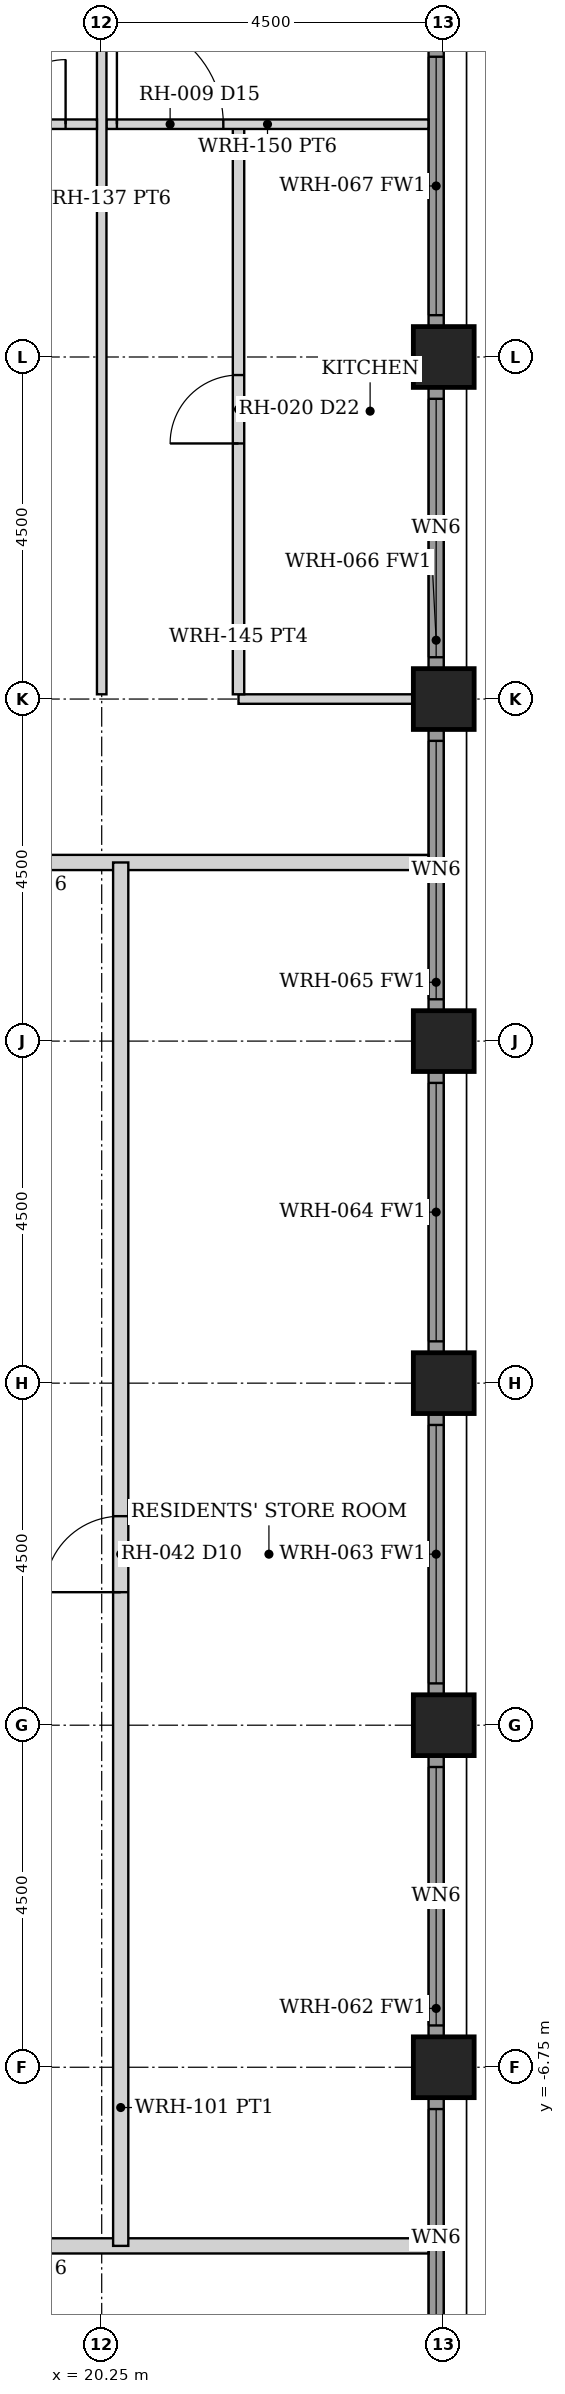
"""IFC4 building model, lengths in metres.
Left out: names, types, materials, properties, quantities, classifications, styles, units other than length and angle.
Written with IfcOpenShell. Run it as: python <this file> out.ifc"""

import sys

from ifc_helpers import new_model, si_unit, direction, frame, frame_2d, origin, origin_2d, place, context, subcontext, project, spatial, rectangle, hollow_rectangle, extrude, element, fill, save


model = new_model("IFC4")
c1 = context("Model", 3, precision=1e-05, world=origin(), true_north=direction((0.0, 1.0)))
c2 = subcontext(c1, "Body", "Model", "MODEL_VIEW")
j1 = project(units=[si_unit("LENGTHUNIT", "METRE"), si_unit("PLANEANGLEUNIT", "RADIAN")], contexts=[c1])
p1 = place(None, origin())
s1 = spatial("IfcSite", under=j1, at=p1, CompositionType="ELEMENT")
p2 = place(p1, origin())
s2 = spatial("IfcBuilding", under=s1, at=p2, CompositionType="ELEMENT")
p3 = place(p2, frame((0.0, 0.0, 103.5)))
s3 = spatial("IfcBuildingStorey", under=s2, at=p3, CompositionType="ELEMENT", Elevation=103.5)
for number, where, z_axis, x_axis in (
    (1, (24.75, -6.75, 0.0), (0.0, 0.0, 1.0), (1.0, 0.0, 0.0)),
    (2, (24.75, -2.25, 0.0), (0.0, 0.0, 1.0), (1.0, 0.0, 0.0)),
    (3, (24.75, 2.25, 0.0), (0.0, 0.0, 1.0), (1.0, 0.0, 0.0)),
    (4, (24.75, 6.75, 0.0), (0.0, 0.0, 1.0), (1.0, 0.0, 0.0)),
    (5, (24.75, 11.25, 0.0), (0.0, 0.0, 1.0), (1.0, 0.0, 0.0)),
    (6, (24.75, 15.75, 0.0), (0.0, 0.0, 1.0), (1.0, 0.0, 0.0)),
):
    element("IfcColumn", number, at=place(p3, frame(where, z_axis=z_axis, x_axis=x_axis)), inside=s3, PredefinedType="COLUMN", context=c2, shape_type="SweptSolid", body=[
        extrude(hollow_rectangle(XDim=0.8, YDim=0.8, WallThickness=0.06, at=origin_2d()), origin(), (0.0, 0.0, 1.0), 3.5),
    ])
p4 = place(p3, frame((24.65, -10.845, 0.0), z_axis=(0.0, 0.0, 1.0), x_axis=(0.0, 1.0, 0.0)))
e7 = element("IfcWall", 7, at=p4, inside=s3, PredefinedType="SOLIDWALL", context=c2, shape_type="SweptSolid", body=[
    extrude(rectangle(XDim=3.69, YDim=0.2, at=frame_2d((1.845, 0.0))), origin(), (0.0, 0.0, 1.0), 2.279),
])
p5 = place(p4, frame((0.145, 0.0, 0.3)))
e8 = element("IfcOpeningElement", 8, at=p5, cuts=e7, PredefinedType="OPENING", context=c2, shape_type="SweptSolid", body=[
    extrude(rectangle(XDim=3.4, YDim=1.829, at=frame_2d((1.7, 0.915))), frame((0.0, 0.11, 0.0), z_axis=(0.0, -1.0, 0.0), x_axis=(1.0, 0.0, 0.0)), (0.0, 0.0, 1.0), 0.22),
])
p6 = place(p3, frame((24.65, -6.345, 0.0), z_axis=(0.0, 0.0, 1.0), x_axis=(0.0, 1.0, 0.0)))
e9 = element("IfcWall", 9, at=p6, inside=s3, PredefinedType="SOLIDWALL", context=c2, shape_type="SweptSolid", body=[
    extrude(rectangle(XDim=3.69, YDim=0.2, at=frame_2d((1.845, 0.0))), origin(), (0.0, 0.0, 1.0), 2.279),
])
p7 = place(p6, frame((0.145, 0.0, 0.3)))
e10 = element("IfcOpeningElement", 10, at=p7, cuts=e9, PredefinedType="OPENING", context=c2, shape_type="SweptSolid", body=[
    extrude(rectangle(XDim=3.4, YDim=1.829, at=frame_2d((1.7, 0.915))), frame((0.0, 0.11, 0.0), z_axis=(0.0, -1.0, 0.0), x_axis=(1.0, 0.0, 0.0)), (0.0, 0.0, 1.0), 0.22),
])
p8 = place(p3, frame((24.65, -1.845, 0.0), z_axis=(0.0, 0.0, 1.0), x_axis=(0.0, 1.0, 0.0)))
e11 = element("IfcWall", 11, at=p8, inside=s3, PredefinedType="SOLIDWALL", context=c2, shape_type="SweptSolid", body=[
    extrude(rectangle(XDim=3.69, YDim=0.2, at=frame_2d((1.845, 0.0))), origin(), (0.0, 0.0, 1.0), 2.279),
])
p9 = place(p8, frame((0.145, 0.0, 0.3)))
e12 = element("IfcOpeningElement", 12, at=p9, cuts=e11, PredefinedType="OPENING", context=c2, shape_type="SweptSolid", body=[
    extrude(rectangle(XDim=3.4, YDim=1.829, at=frame_2d((1.7, 0.915))), frame((0.0, 0.11, 0.0), z_axis=(0.0, -1.0, 0.0), x_axis=(1.0, 0.0, 0.0)), (0.0, 0.0, 1.0), 0.22),
])
p10 = place(p3, frame((24.65, 2.655, 0.0), z_axis=(0.0, 0.0, 1.0), x_axis=(0.0, 1.0, 0.0)))
e13 = element("IfcWall", 13, at=p10, inside=s3, PredefinedType="SOLIDWALL", context=c2, shape_type="SweptSolid", body=[
    extrude(rectangle(XDim=3.69, YDim=0.2, at=frame_2d((1.845, 0.0))), origin(), (0.0, 0.0, 1.0), 2.279),
])
p11 = place(p10, frame((0.145, 0.0, 0.3)))
e14 = element("IfcOpeningElement", 14, at=p11, cuts=e13, PredefinedType="OPENING", context=c2, shape_type="SweptSolid", body=[
    extrude(rectangle(XDim=3.4, YDim=1.829, at=frame_2d((1.7, 0.915))), frame((0.0, 0.11, 0.0), z_axis=(0.0, -1.0, 0.0), x_axis=(1.0, 0.0, 0.0)), (0.0, 0.0, 1.0), 0.22),
])
p12 = place(p3, frame((24.65, 7.155, 0.0), z_axis=(0.0, 0.0, 1.0), x_axis=(0.0, 1.0, 0.0)))
e15 = element("IfcWall", 15, at=p12, inside=s3, PredefinedType="SOLIDWALL", context=c2, shape_type="SweptSolid", body=[
    extrude(rectangle(XDim=3.69, YDim=0.2, at=frame_2d((1.845, 0.0))), origin(), (0.0, 0.0, 1.0), 2.279),
])
p13 = place(p12, frame((0.145, 0.0, 0.3)))
e16 = element("IfcOpeningElement", 16, at=p13, cuts=e15, PredefinedType="OPENING", context=c2, shape_type="SweptSolid", body=[
    extrude(rectangle(XDim=3.4, YDim=1.829, at=frame_2d((1.7, 0.915))), frame((0.0, 0.11, 0.0), z_axis=(0.0, -1.0, 0.0), x_axis=(1.0, 0.0, 0.0)), (0.0, 0.0, 1.0), 0.22),
])
p14 = place(p3, frame((24.65, 11.655, 0.0), z_axis=(0.0, 0.0, 1.0), x_axis=(0.0, 1.0, 0.0)))
e17 = element("IfcWall", 17, at=p14, inside=s3, PredefinedType="SOLIDWALL", context=c2, shape_type="SweptSolid", body=[
    extrude(rectangle(XDim=3.69, YDim=0.2, at=frame_2d((1.845, 0.0))), origin(), (0.0, 0.0, 1.0), 2.279),
])
p15 = place(p14, frame((0.145, 0.0, 0.3)))
e18 = element("IfcOpeningElement", 18, at=p15, cuts=e17, PredefinedType="OPENING", context=c2, shape_type="SweptSolid", body=[
    extrude(rectangle(XDim=3.4, YDim=1.829, at=frame_2d((1.7, 0.915))), frame((0.0, 0.11, 0.0), z_axis=(0.0, -1.0, 0.0), x_axis=(1.0, 0.0, 0.0)), (0.0, 0.0, 1.0), 0.22),
])
p16 = place(p3, frame((24.65, 16.155, 0.0), z_axis=(0.0, 0.0, 1.0), x_axis=(0.0, 1.0, 0.0)))
e19 = element("IfcWall", 19, at=p16, inside=s3, PredefinedType="SOLIDWALL", context=c2, shape_type="SweptSolid", body=[
    extrude(rectangle(XDim=3.69, YDim=0.2, at=frame_2d((1.845, 0.0))), origin(), (0.0, 0.0, 1.0), 2.279),
])
p17 = place(p16, frame((0.145, 0.0, 0.3)))
e20 = element("IfcOpeningElement", 20, at=p17, cuts=e19, PredefinedType="OPENING", context=c2, shape_type="SweptSolid", body=[
    extrude(rectangle(XDim=3.4, YDim=1.829, at=frame_2d((1.7, 0.915))), frame((0.0, 0.11, 0.0), z_axis=(0.0, -1.0, 0.0), x_axis=(1.0, 0.0, 0.0)), (0.0, 0.0, 1.0), 0.22),
])
p18 = place(p3, frame((-24.55, 9.1, 0.0), z_axis=(0.0, 0.0, 1.0), x_axis=(1.0, 0.0, 0.0)))
e21 = element("IfcWall", 21, at=p18, inside=s3, PredefinedType="PARTITIONING", context=c2, shape_type="SweptSolid", body=[
    extrude(rectangle(XDim=49.1, YDim=0.2, at=frame_2d((24.55, 0.0))), origin(), (0.0, 0.0, 1.0), 2.279),
])
p19 = place(p18, frame((5.05, 0.0, 0.0)))
e22 = element("IfcOpeningElement", 22, at=p19, cuts=e21, PredefinedType="OPENING", context=c2, shape_type="SweptSolid", body=[
    extrude(rectangle(XDim=1.0, YDim=2.3, at=frame_2d((0.5, 1.15))), frame((0.0, 0.11, 0.0), z_axis=(0.0, -1.0, 0.0), x_axis=(1.0, 0.0, 0.0)), (0.0, 0.0, 1.0), 0.22),
])
p20 = place(p18, frame((22.5, 0.0, 0.0)))
e23 = element("IfcOpeningElement", 23, at=p20, cuts=e21, PredefinedType="OPENING", context=c2, shape_type="SweptSolid", body=[
    extrude(rectangle(XDim=0.9, YDim=2.1, at=frame_2d((0.45, 1.05))), frame((0.0, 0.11, 0.0), z_axis=(0.0, -1.0, 0.0), x_axis=(1.0, 0.0, 0.0)), (0.0, 0.0, 1.0), 0.22),
])
p21 = place(p18, frame((43.05, 0.0, 0.0)))
e24 = element("IfcOpeningElement", 24, at=p21, cuts=e21, PredefinedType="OPENING", context=c2, shape_type="SweptSolid", body=[
    extrude(rectangle(XDim=1.0, YDim=2.3, at=frame_2d((0.5, 1.15))), frame((0.0, 0.11, 0.0), z_axis=(0.0, -1.0, 0.0), x_axis=(1.0, 0.0, 0.0)), (0.0, 0.0, 1.0), 0.22),
])
p22 = place(p3, frame((-24.55, -9.1, 0.0), z_axis=(0.0, 0.0, 1.0), x_axis=(1.0, 0.0, 0.0)))
e25 = element("IfcWall", 25, at=p22, inside=s3, PredefinedType="PARTITIONING", context=c2, shape_type="SweptSolid", body=[
    extrude(rectangle(XDim=49.1, YDim=0.2, at=frame_2d((24.55, 0.0))), origin(), (0.0, 0.0, 1.0), 2.279),
])
p23 = place(p22, frame((5.05, 0.0, 0.0)))
e26 = element("IfcOpeningElement", 26, at=p23, cuts=e25, PredefinedType="OPENING", context=c2, shape_type="SweptSolid", body=[
    extrude(rectangle(XDim=1.0, YDim=2.3, at=frame_2d((0.5, 1.15))), frame((0.0, 0.11, 0.0), z_axis=(0.0, -1.0, 0.0), x_axis=(1.0, 0.0, 0.0)), (0.0, 0.0, 1.0), 0.22),
])
p24 = place(p22, frame((22.5, 0.0, 0.0)))
e27 = element("IfcOpeningElement", 27, at=p24, cuts=e25, PredefinedType="OPENING", context=c2, shape_type="SweptSolid", body=[
    extrude(rectangle(XDim=0.9, YDim=2.1, at=frame_2d((0.45, 1.05))), frame((0.0, 0.11, 0.0), z_axis=(0.0, -1.0, 0.0), x_axis=(1.0, 0.0, 0.0)), (0.0, 0.0, 1.0), 0.22),
])
p25 = place(p22, frame((43.05, 0.0, 0.0)))
e28 = element("IfcOpeningElement", 28, at=p25, cuts=e25, PredefinedType="OPENING", context=c2, shape_type="SweptSolid", body=[
    extrude(rectangle(XDim=1.0, YDim=2.3, at=frame_2d((0.5, 1.15))), frame((0.0, 0.11, 0.0), z_axis=(0.0, -1.0, 0.0), x_axis=(1.0, 0.0, 0.0)), (0.0, 0.0, 1.0), 0.22),
])
p26 = place(p3, frame((20.5, -9.1, 0.0), z_axis=(0.0, 0.0, 1.0), x_axis=(0.0, 1.0, 0.0)))
e29 = element("IfcWall", 29, at=p26, inside=s3, PredefinedType="PARTITIONING", context=c2, shape_type="SweptSolid", body=[
    extrude(rectangle(XDim=18.2, YDim=0.2, at=frame_2d((9.1, 0.0))), origin(), (0.0, 0.0, 1.0), 2.279),
])
p27 = place(p26, frame((8.6, 0.0, 0.0)))
e30 = element("IfcOpeningElement", 30, at=p27, cuts=e29, PredefinedType="OPENING", context=c2, shape_type="SweptSolid", body=[
    extrude(rectangle(XDim=1.0, YDim=2.1, at=frame_2d((0.5, 1.05))), frame((0.0, 0.11, 0.0), z_axis=(0.0, -1.0, 0.0), x_axis=(1.0, 0.0, 0.0)), (0.0, 0.0, 1.0), 0.22),
])
p28 = place(p3, frame((22.05, 11.25, 0.0), z_axis=(0.0, 0.0, 1.0), x_axis=(1.0, 0.0, 0.0)))
e31 = element("IfcWall", 31, at=p28, inside=s3, PredefinedType="PARTITIONING", context=c2, shape_type="SweptSolid", body=[
    extrude(rectangle(XDim=2.3, YDim=0.125, at=frame_2d((1.15, 0.0))), origin(), (0.0, 0.0, 1.0), 2.279),
])
p29 = place(p3, frame((22.05, 11.312, 0.0), z_axis=(0.0, 0.0, 1.0), x_axis=(0.0, 1.0, 0.0)))
e32 = element("IfcWall", 32, at=p29, inside=s3, PredefinedType="PARTITIONING", context=c2, shape_type="SweptSolid", body=[
    extrude(rectangle(XDim=7.5, YDim=0.15, at=frame_2d((3.75, 0.0))), origin(), (0.0, 0.0, 1.0), 2.279),
])
p30 = place(p29, frame((3.3, 0.0, 0.0)))
e33 = element("IfcOpeningElement", 33, at=p30, cuts=e32, PredefinedType="OPENING", context=c2, shape_type="SweptSolid", body=[
    extrude(rectangle(XDim=0.9, YDim=2.1, at=frame_2d((0.45, 1.05))), frame((0.0, 0.085, 0.0), z_axis=(0.0, -1.0, 0.0), x_axis=(1.0, 0.0, 0.0)), (0.0, 0.0, 1.0), 0.17),
])
p31 = place(p3, frame((20.312, 18.812, 0.0), z_axis=(0.0, 0.0, 1.0), x_axis=(1.0, 0.0, 0.0)))
e34 = element("IfcWall", 34, at=p31, inside=s3, PredefinedType="PARTITIONING", context=c2, shape_type="SweptSolid", body=[
    extrude(rectangle(XDim=4.238, YDim=0.125, at=frame_2d((2.119, 0.0))), origin(), (0.0, 0.0, 1.0), 2.279),
])
p32 = place(p31, frame((0.137, 0.0, 0.0)))
e35 = element("IfcOpeningElement", 35, at=p32, cuts=e34, PredefinedType="OPENING", context=c2, shape_type="SweptSolid", body=[
    extrude(rectangle(XDim=1.4, YDim=2.1, at=frame_2d((0.7, 1.05))), frame((0.0, 0.073, 0.0), z_axis=(0.0, -1.0, 0.0), x_axis=(1.0, 0.0, 0.0)), (0.0, 0.0, 1.0), 0.145),
])
p33 = place(p3, frame((20.25, 11.312, 0.0), z_axis=(0.0, 0.0, 1.0), x_axis=(0.0, 1.0, 0.0)))
e36 = element("IfcWall", 36, at=p33, inside=s3, PredefinedType="PARTITIONING", context=c2, shape_type="SweptSolid", body=[
    extrude(rectangle(XDim=13.038, YDim=0.125, at=frame_2d((6.519, 0.0))), origin(), (0.0, 0.0, 1.0), 2.279),
])
p34 = place(p3, frame((15.812, 18.812, 0.0), z_axis=(0.0, 0.0, 1.0), x_axis=(1.0, 0.0, 0.0)))
e37 = element("IfcWall", 37, at=p34, inside=s3, PredefinedType="PARTITIONING", context=c2, shape_type="SweptSolid", body=[
    extrude(rectangle(XDim=4.375, YDim=0.125, at=frame_2d((2.188, 0.0))), origin(), (0.0, 0.0, 1.0), 2.279),
])
p35 = place(p34, frame((3.113, 0.0, 0.0)))
e38 = element("IfcOpeningElement", 38, at=p35, cuts=e37, PredefinedType="OPENING", context=c2, shape_type="SweptSolid", body=[
    extrude(rectangle(XDim=0.85, YDim=2.1, at=frame_2d((0.425, 1.05))), frame((0.0, 0.073, 0.0), z_axis=(0.0, -1.0, 0.0), x_axis=(1.0, 0.0, 0.0)), (0.0, 0.0, 1.0), 0.145),
])
p36 = place(p34, frame((0.881, 0.0, 0.0)))
e39 = element("IfcOpeningElement", 39, at=p36, cuts=e37, PredefinedType="OPENING", context=c2, shape_type="SweptSolid", body=[
    extrude(rectangle(XDim=0.8, YDim=2.1, at=frame_2d((0.4, 1.05))), frame((0.0, 0.073, 0.0), z_axis=(0.0, -1.0, 0.0), x_axis=(1.0, 0.0, 0.0)), (0.0, 0.0, 1.0), 0.145),
])
p37 = place(p5, origin())
e40 = element("IfcWindow", 40, at=p37, inside=s3, PartitioningType="SINGLE_PANEL", PredefinedType="WINDOW", context=c2, shape_type="SweptSolid", body=[
    extrude(rectangle(XDim=3.4, YDim=1.829, at=frame_2d((1.7, 0.915))), frame((0.0, 0.03, 0.0), z_axis=(0.0, -1.0, 0.0), x_axis=(1.0, 0.0, 0.0)), (0.0, 0.0, 1.0), 0.06),
])
fill(e8, e40)
p38 = place(p7, origin())
e41 = element("IfcWindow", 41, at=p38, inside=s3, PartitioningType="SINGLE_PANEL", PredefinedType="WINDOW", context=c2, shape_type="SweptSolid", body=[
    extrude(rectangle(XDim=3.4, YDim=1.829, at=frame_2d((1.7, 0.915))), frame((0.0, 0.03, 0.0), z_axis=(0.0, -1.0, 0.0), x_axis=(1.0, 0.0, 0.0)), (0.0, 0.0, 1.0), 0.06),
])
fill(e10, e41)
p39 = place(p9, origin())
e42 = element("IfcWindow", 42, at=p39, inside=s3, PartitioningType="SINGLE_PANEL", PredefinedType="WINDOW", context=c2, shape_type="SweptSolid", body=[
    extrude(rectangle(XDim=3.4, YDim=1.829, at=frame_2d((1.7, 0.915))), frame((0.0, 0.03, 0.0), z_axis=(0.0, -1.0, 0.0), x_axis=(1.0, 0.0, 0.0)), (0.0, 0.0, 1.0), 0.06),
])
fill(e12, e42)
p40 = place(p11, origin())
e43 = element("IfcWindow", 43, at=p40, inside=s3, PartitioningType="SINGLE_PANEL", PredefinedType="WINDOW", context=c2, shape_type="SweptSolid", body=[
    extrude(rectangle(XDim=3.4, YDim=1.829, at=frame_2d((1.7, 0.915))), frame((0.0, 0.03, 0.0), z_axis=(0.0, -1.0, 0.0), x_axis=(1.0, 0.0, 0.0)), (0.0, 0.0, 1.0), 0.06),
])
fill(e14, e43)
p41 = place(p13, origin())
e44 = element("IfcWindow", 44, at=p41, inside=s3, PartitioningType="SINGLE_PANEL", PredefinedType="WINDOW", context=c2, shape_type="SweptSolid", body=[
    extrude(rectangle(XDim=3.4, YDim=1.829, at=frame_2d((1.7, 0.915))), frame((0.0, 0.03, 0.0), z_axis=(0.0, -1.0, 0.0), x_axis=(1.0, 0.0, 0.0)), (0.0, 0.0, 1.0), 0.06),
])
fill(e16, e44)
p42 = place(p15, origin())
e45 = element("IfcWindow", 45, at=p42, inside=s3, PartitioningType="SINGLE_PANEL", PredefinedType="WINDOW", context=c2, shape_type="SweptSolid", body=[
    extrude(rectangle(XDim=3.4, YDim=1.829, at=frame_2d((1.7, 0.915))), frame((0.0, 0.03, 0.0), z_axis=(0.0, -1.0, 0.0), x_axis=(1.0, 0.0, 0.0)), (0.0, 0.0, 1.0), 0.06),
])
fill(e18, e45)
p43 = place(p17, origin())
e46 = element("IfcWindow", 46, at=p43, inside=s3, PartitioningType="SINGLE_PANEL", PredefinedType="WINDOW", context=c2, shape_type="SweptSolid", body=[
    extrude(rectangle(XDim=3.4, YDim=1.829, at=frame_2d((1.7, 0.915))), frame((0.0, 0.03, 0.0), z_axis=(0.0, -1.0, 0.0), x_axis=(1.0, 0.0, 0.0)), (0.0, 0.0, 1.0), 0.06),
])
fill(e20, e46)
p44 = place(p30, origin())
e47 = element("IfcDoor", 47, at=p44, inside=s3, OperationType="SINGLE_SWING_LEFT", PredefinedType="DOOR", context=c2, shape_type="SweptSolid", body=[
    extrude(rectangle(XDim=0.9, YDim=2.1, at=frame_2d((0.45, 1.05))), frame((0.0, 0.025, 0.0), z_axis=(0.0, -1.0, 0.0), x_axis=(1.0, 0.0, 0.0)), (0.0, 0.0, 1.0), 0.05),
])
fill(e33, e47)
p45 = place(p32, origin())
e48 = element("IfcDoor", 48, at=p45, inside=s3, OperationType="SINGLE_SWING_LEFT", PredefinedType="DOOR", context=c2, shape_type="SweptSolid", body=[
    extrude(rectangle(XDim=1.4, YDim=2.1, at=frame_2d((0.7, 1.05))), frame((0.0, 0.025, 0.0), z_axis=(0.0, -1.0, 0.0), x_axis=(1.0, 0.0, 0.0)), (0.0, 0.0, 1.0), 0.05),
])
fill(e35, e48)
p46 = place(p35, origin())
e49 = element("IfcDoor", 49, at=p46, inside=s3, OperationType="SINGLE_SWING_RIGHT", PredefinedType="DOOR", context=c2, shape_type="SweptSolid", body=[
    extrude(rectangle(XDim=0.85, YDim=2.1, at=frame_2d((0.425, 1.05))), frame((0.0, 0.025, 0.0), z_axis=(0.0, -1.0, 0.0), x_axis=(1.0, 0.0, 0.0)), (0.0, 0.0, 1.0), 0.05),
])
fill(e38, e49)
p47 = place(p27, origin())
e50 = element("IfcDoor", 50, at=p47, inside=s3, OperationType="SINGLE_SWING_LEFT", PredefinedType="DOOR", context=c2, shape_type="SweptSolid", body=[
    extrude(rectangle(XDim=1.0, YDim=2.1, at=frame_2d((0.5, 1.05))), frame((0.0, 0.025, 0.0), z_axis=(0.0, -1.0, 0.0), x_axis=(1.0, 0.0, 0.0)), (0.0, 0.0, 1.0), 0.05),
])
fill(e30, e50)
save(model, sys.argv[1])
